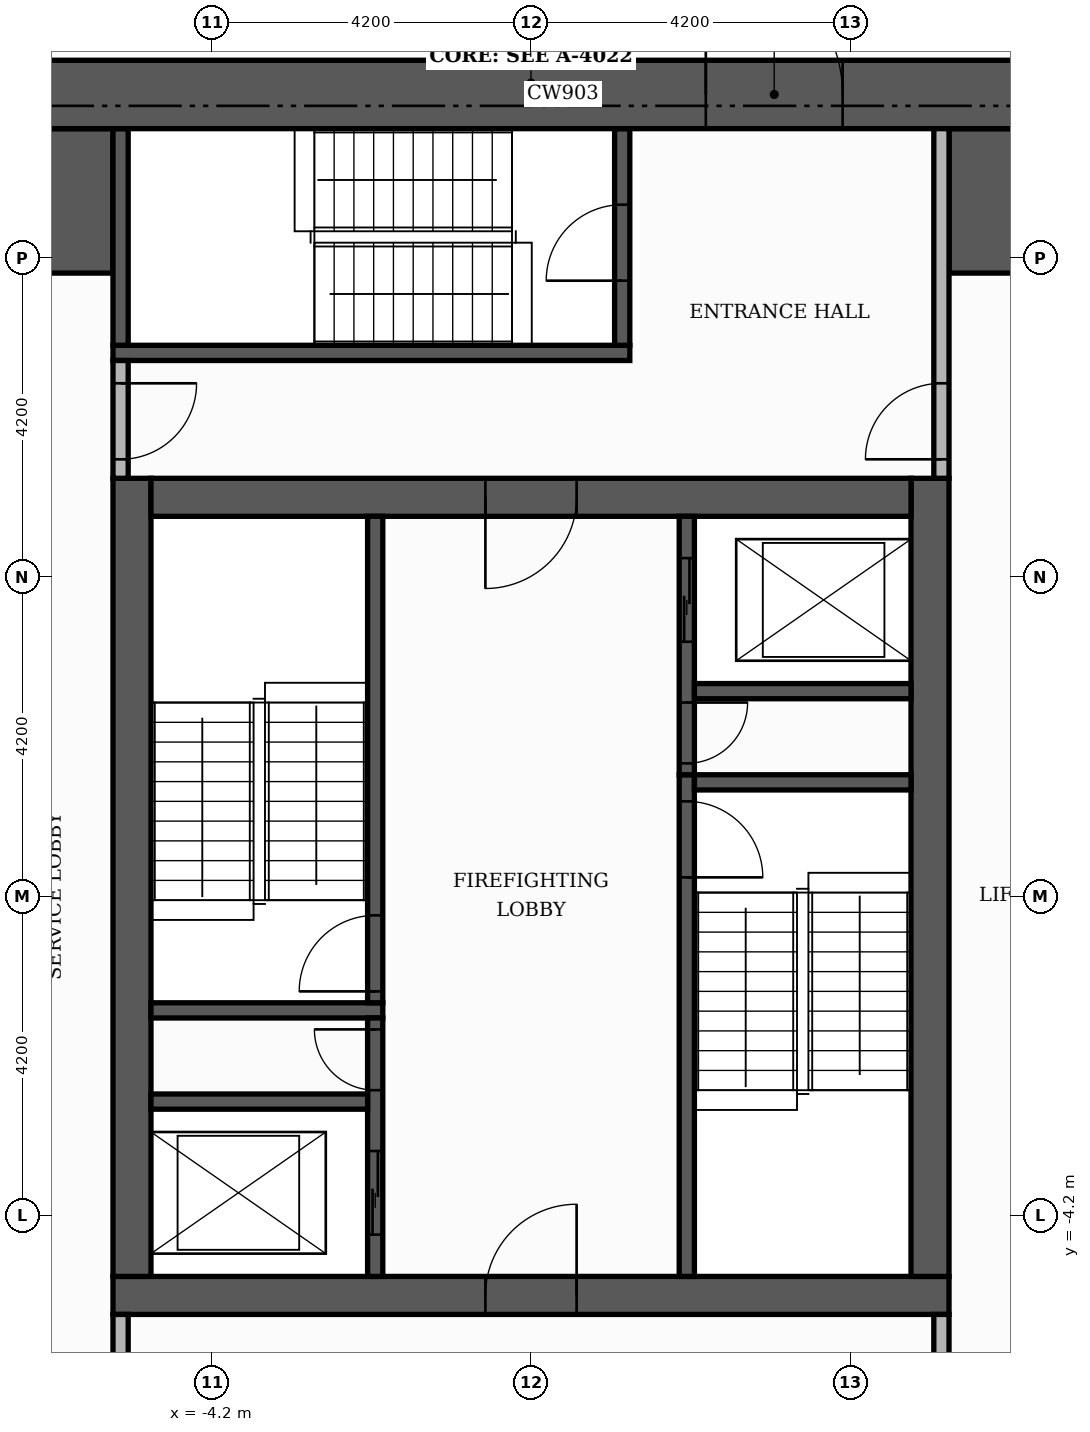
"""IFC4 building model, lengths in metres.
Left out: names, types, materials, properties, quantities, classifications, styles, units other than length and angle.
Written with IfcOpenShell. Run it as: python <this file> out.ifc"""

import sys

from ifc_helpers import new_model, si_unit, direction, frame, frame_2d, origin, place, context, subcontext, project, spatial, rectangle, extrude, element, fill, save


model = new_model("IFC4")
c1 = context("Model", 3, precision=1e-05, world=origin(), true_north=direction((0.0, 1.0)))
c2 = subcontext(c1, "Body", "Model", "MODEL_VIEW")
j1 = project(units=[si_unit("LENGTHUNIT", "METRE"), si_unit("PLANEANGLEUNIT", "RADIAN")], contexts=[c1])
p1 = place(None, origin())
s1 = spatial("IfcSite", under=j1, at=p1, CompositionType="ELEMENT")
p2 = place(p1, origin())
s2 = spatial("IfcBuilding", under=s1, at=p2, CompositionType="ELEMENT")
p3 = place(p2, frame((0.0, 0.0, 137.7)))
s3 = spatial("IfcBuildingStorey", under=s2, at=p3, CompositionType="ELEMENT", Elevation=137.7)
p4 = place(p3, frame((-5.5, -5.25, 0.0), z_axis=(0.0, 0.0, 1.0), x_axis=(1.0, 0.0, 0.0)))
e1 = element("IfcWall", 1, at=p4, inside=s3, PredefinedType="SHEAR", context=c2, shape_type="SweptSolid", body=[
    extrude(rectangle(XDim=11.0, YDim=0.5, at=frame_2d((5.5, 0.0))), origin(), (0.0, 0.0, 1.0), 3.48),
])
p5 = place(p4, frame((4.9, 0.0, 0.0)))
e2 = element("IfcOpeningElement", 2, at=p5, cuts=e1, PredefinedType="OPENING", context=c2, shape_type="SweptSolid", body=[
    extrude(rectangle(XDim=1.2, YDim=2.1, at=frame_2d((0.6, 1.05))), frame((0.0, 0.26, 0.0), z_axis=(0.0, -1.0, 0.0), x_axis=(1.0, 0.0, 0.0)), (0.0, 0.0, 1.0), 0.52),
])
for number, where, z_axis, x_axis in (
    (3, (-5.25, -5.0, 0.0), (0.0, 0.0, 1.0), (0.0, 1.0, 0.0)),
    (4, (5.25, -5.0, 0.0), (0.0, 0.0, 1.0), (0.0, 1.0, 0.0)),
):
    element("IfcWall", number, at=place(p3, frame(where, z_axis=z_axis, x_axis=x_axis)), inside=s3, PredefinedType="SHEAR", context=c2, shape_type="SweptSolid", body=[
        extrude(rectangle(XDim=10.5, YDim=0.5, at=frame_2d((5.25, 0.0))), origin(), (0.0, 0.0, 1.0), 3.48),
    ])
p6 = place(p3, frame((-5.0, 5.25, 0.0), z_axis=(0.0, 0.0, 1.0), x_axis=(1.0, 0.0, 0.0)))
e5 = element("IfcWall", 5, at=p6, inside=s3, PredefinedType="SHEAR", context=c2, shape_type="SweptSolid", body=[
    extrude(rectangle(XDim=10.0, YDim=0.5, at=frame_2d((5.0, 0.0))), origin(), (0.0, 0.0, 1.0), 3.48),
])
p7 = place(p6, frame((4.4, 0.0, 0.0)))
e6 = element("IfcOpeningElement", 6, at=p7, cuts=e5, PredefinedType="OPENING", context=c2, shape_type="SweptSolid", body=[
    extrude(rectangle(XDim=1.2, YDim=2.1, at=frame_2d((0.6, 1.05))), frame((0.0, 0.26, 0.0), z_axis=(0.0, -1.0, 0.0), x_axis=(1.0, 0.0, 0.0)), (0.0, 0.0, 1.0), 0.52),
])
for number, where, z_axis, x_axis in (
    (7, (-10.1, 9.15, 0.0), (0.0, 0.0, 1.0), (1.0, 0.0, 0.0)),
    (8, (5.5, 9.15, 0.0), (0.0, 0.0, 1.0), (1.0, 0.0, 0.0)),
):
    element("IfcWall", number, at=place(p3, frame(where, z_axis=z_axis, x_axis=x_axis)), inside=s3, PredefinedType="SHEAR", context=c2, shape_type="SweptSolid", body=[
        extrude(rectangle(XDim=4.6, YDim=1.9, at=frame_2d((2.3, 0.0))), origin(), (0.0, 0.0, 1.0), 3.48),
    ])
p8 = place(p3, frame((2.05, -5.0, 0.0), z_axis=(0.0, 0.0, 1.0), x_axis=(0.0, 1.0, 0.0)))
e9 = element("IfcWall", 9, at=p8, inside=s3, PredefinedType="SHEAR", context=c2, shape_type="SweptSolid", body=[
    extrude(rectangle(XDim=6.6, YDim=0.2, at=frame_2d((3.3, 0.0))), origin(), (0.0, 0.0, 1.0), 3.48),
])
p9 = place(p8, frame((5.25, 0.0, 0.0)))
e10 = element("IfcOpeningElement", 10, at=p9, cuts=e9, PredefinedType="OPENING", context=c2, shape_type="SweptSolid", body=[
    extrude(rectangle(XDim=1.0, YDim=2.1, at=frame_2d((0.5, 1.05))), frame((0.0, 0.11, 0.0), z_axis=(0.0, -1.0, 0.0), x_axis=(1.0, 0.0, 0.0)), (0.0, 0.0, 1.0), 0.22),
])
p10 = place(p3, frame((-5.0, -1.5, 0.0), z_axis=(0.0, 0.0, 1.0), x_axis=(1.0, 0.0, 0.0)))
e11 = element("IfcWall", 11, at=p10, inside=s3, PredefinedType="SHEAR", context=c2, shape_type="SweptSolid", body=[
    extrude(rectangle(XDim=3.05, YDim=0.2, at=frame_2d((1.525, 0.0))), origin(), (0.0, 0.0, 1.0), 3.48),
])
p11 = place(p3, frame((-2.05, -1.4, 0.0), z_axis=(0.0, 0.0, 1.0), x_axis=(0.0, 1.0, 0.0)))
e12 = element("IfcWall", 12, at=p11, inside=s3, PredefinedType="SHEAR", context=c2, shape_type="SweptSolid", body=[
    extrude(rectangle(XDim=6.4, YDim=0.2, at=frame_2d((3.2, 0.0))), origin(), (0.0, 0.0, 1.0), 3.48),
])
p12 = place(p11, frame((0.15, 0.0, 0.0)))
e13 = element("IfcOpeningElement", 13, at=p12, cuts=e12, PredefinedType="OPENING", context=c2, shape_type="SweptSolid", body=[
    extrude(rectangle(XDim=1.0, YDim=2.1, at=frame_2d((0.5, 1.05))), frame((0.0, 0.11, 0.0), z_axis=(0.0, -1.0, 0.0), x_axis=(1.0, 0.0, 0.0)), (0.0, 0.0, 1.0), 0.22),
])
p13 = place(p3, frame((2.15, 1.5, 0.0), z_axis=(0.0, 0.0, 1.0), x_axis=(1.0, 0.0, 0.0)))
e14 = element("IfcWall", 14, at=p13, inside=s3, PredefinedType="SHEAR", context=c2, shape_type="SweptSolid", body=[
    extrude(rectangle(XDim=2.85, YDim=0.2, at=frame_2d((1.425, 0.0))), origin(), (0.0, 0.0, 1.0), 3.48),
])
p14 = place(p3, frame((-5.5, 7.15, 0.0), z_axis=(0.0, 0.0, 1.0), x_axis=(1.0, 0.0, 0.0)))
e15 = element("IfcWall", 15, at=p14, inside=s3, PredefinedType="SHEAR", context=c2, shape_type="SweptSolid", body=[
    extrude(rectangle(XDim=6.8, YDim=0.2, at=frame_2d((3.4, 0.0))), origin(), (0.0, 0.0, 1.0), 3.48),
])
p15 = place(p3, frame((-5.4, 7.25, 0.0), z_axis=(0.0, 0.0, 1.0), x_axis=(0.0, 1.0, 0.0)))
e16 = element("IfcWall", 16, at=p15, inside=s3, PredefinedType="SHEAR", context=c2, shape_type="SweptSolid", body=[
    extrude(rectangle(XDim=2.85, YDim=0.2, at=frame_2d((1.425, 0.0))), origin(), (0.0, 0.0, 1.0), 3.48),
])
p16 = place(p3, frame((1.2, 7.25, 0.0), z_axis=(0.0, 0.0, 1.0), x_axis=(0.0, 1.0, 0.0)))
e17 = element("IfcWall", 17, at=p16, inside=s3, PredefinedType="SHEAR", context=c2, shape_type="SweptSolid", body=[
    extrude(rectangle(XDim=2.85, YDim=0.2, at=frame_2d((1.425, 0.0))), origin(), (0.0, 0.0, 1.0), 3.48),
])
p17 = place(p16, frame((0.85, 0.0, 0.0)))
e18 = element("IfcOpeningElement", 18, at=p17, cuts=e17, PredefinedType="OPENING", context=c2, shape_type="SweptSolid", body=[
    extrude(rectangle(XDim=1.0, YDim=2.1, at=frame_2d((0.5, 1.05))), frame((0.0, 0.11, 0.0), z_axis=(0.0, -1.0, 0.0), x_axis=(1.0, 0.0, 0.0)), (0.0, 0.0, 1.0), 0.22),
])
p18 = place(p3, frame((-2.05, -5.0, 0.0), z_axis=(0.0, 0.0, 1.0), x_axis=(0.0, 1.0, 0.0)))
e19 = element("IfcWall", 19, at=p18, inside=s3, PredefinedType="SHEAR", context=c2, shape_type="SweptSolid", body=[
    extrude(rectangle(XDim=3.4, YDim=0.2, at=frame_2d((1.7, 0.0))), origin(), (0.0, 0.0, 1.0), 3.48),
])
p19 = place(p18, frame((0.55, 0.0, 0.0)))
e20 = element("IfcOpeningElement", 20, at=p19, cuts=e19, PredefinedType="OPENING", context=c2, shape_type="SweptSolid", body=[
    extrude(rectangle(XDim=1.1, YDim=2.1, at=frame_2d((0.55, 1.05))), frame((0.0, 0.11, 0.0), z_axis=(0.0, -1.0, 0.0), x_axis=(1.0, 0.0, 0.0)), (0.0, 0.0, 1.0), 0.22),
])
p20 = place(p18, frame((2.45, 0.0, 0.0)))
e21 = element("IfcOpeningElement", 21, at=p20, cuts=e19, PredefinedType="OPENING", context=c2, shape_type="SweptSolid", body=[
    extrude(rectangle(XDim=0.8, YDim=2.1, at=frame_2d((0.4, 1.05))), frame((0.0, 0.11, 0.0), z_axis=(0.0, -1.0, 0.0), x_axis=(1.0, 0.0, 0.0)), (0.0, 0.0, 1.0), 0.22),
])
p21 = place(p3, frame((-5.0, -2.7, 0.0), z_axis=(0.0, 0.0, 1.0), x_axis=(1.0, 0.0, 0.0)))
e22 = element("IfcWall", 22, at=p21, inside=s3, PredefinedType="SHEAR", context=c2, shape_type="SweptSolid", body=[
    extrude(rectangle(XDim=2.85, YDim=0.2, at=frame_2d((1.425, 0.0))), origin(), (0.0, 0.0, 1.0), 3.48),
])
p22 = place(p3, frame((2.05, 1.6, 0.0), z_axis=(0.0, 0.0, 1.0), x_axis=(0.0, 1.0, 0.0)))
e23 = element("IfcWall", 23, at=p22, inside=s3, PredefinedType="SHEAR", context=c2, shape_type="SweptSolid", body=[
    extrude(rectangle(XDim=3.4, YDim=0.2, at=frame_2d((1.7, 0.0))), origin(), (0.0, 0.0, 1.0), 3.48),
])
p23 = place(p22, frame((1.75, 0.0, 0.0)))
e24 = element("IfcOpeningElement", 24, at=p23, cuts=e23, PredefinedType="OPENING", context=c2, shape_type="SweptSolid", body=[
    extrude(rectangle(XDim=1.1, YDim=2.1, at=frame_2d((0.55, 1.05))), frame((0.0, 0.11, 0.0), z_axis=(0.0, -1.0, 0.0), x_axis=(1.0, 0.0, 0.0)), (0.0, 0.0, 1.0), 0.22),
])
p24 = place(p22, frame((0.15, 0.0, 0.0)))
e25 = element("IfcOpeningElement", 25, at=p24, cuts=e23, PredefinedType="OPENING", context=c2, shape_type="SweptSolid", body=[
    extrude(rectangle(XDim=0.8, YDim=2.1, at=frame_2d((0.4, 1.05))), frame((0.0, 0.11, 0.0), z_axis=(0.0, -1.0, 0.0), x_axis=(1.0, 0.0, 0.0)), (0.0, 0.0, 1.0), 0.22),
])
p25 = place(p3, frame((2.15, 2.7, 0.0), z_axis=(0.0, 0.0, 1.0), x_axis=(1.0, 0.0, 0.0)))
e26 = element("IfcWall", 26, at=p25, inside=s3, PredefinedType="SHEAR", context=c2, shape_type="SweptSolid", body=[
    extrude(rectangle(XDim=2.85, YDim=0.2, at=frame_2d((1.425, 0.0))), origin(), (0.0, 0.0, 1.0), 3.48),
])
p26 = place(p3, frame((-11.0, 10.55, 0.0), z_axis=(0.0, 0.0, 1.0), x_axis=(1.0, 0.0, 0.0)))
e27 = element("IfcWall", 27, at=p26, inside=s3, PredefinedType="SHEAR", context=c2, shape_type="SweptSolid", body=[
    extrude(rectangle(XDim=22.0, YDim=0.9, at=frame_2d((11.0, 0.0))), origin(), (0.0, 0.0, 1.0), 3.48),
])
p27 = place(p26, frame((13.3, 0.0, 0.0)))
e28 = element("IfcOpeningElement", 28, at=p27, cuts=e27, PredefinedType="OPENING", context=c2, shape_type="SweptSolid", body=[
    extrude(rectangle(XDim=1.8, YDim=2.2, at=frame_2d((0.9, 1.1))), frame((0.0, 0.46, 0.0), z_axis=(0.0, -1.0, 0.0), x_axis=(1.0, 0.0, 0.0)), (0.0, 0.0, 1.0), 0.92),
])
p28 = place(p3, frame((-5.4, -10.1, 0.0), z_axis=(0.0, 0.0, 1.0), x_axis=(0.0, 1.0, 0.0)))
e29 = element("IfcWall", 29, at=p28, inside=s3, PredefinedType="PARTITIONING", context=c2, shape_type="SweptSolid", body=[
    extrude(rectangle(XDim=4.6, YDim=0.2, at=frame_2d((2.3, 0.0))), origin(), (0.0, 0.0, 1.0), 3.48),
])
p29 = place(p28, frame((2.9, 0.0, 0.0)))
e30 = element("IfcOpeningElement", 30, at=p29, cuts=e29, PredefinedType="OPENING", context=c2, shape_type="SweptSolid", body=[
    extrude(rectangle(XDim=1.0, YDim=2.1, at=frame_2d((0.5, 1.05))), frame((0.0, 0.11, 0.0), z_axis=(0.0, -1.0, 0.0), x_axis=(1.0, 0.0, 0.0)), (0.0, 0.0, 1.0), 0.22),
])
p30 = place(p3, frame((5.4, -10.1, 0.0), z_axis=(0.0, 0.0, 1.0), x_axis=(0.0, 1.0, 0.0)))
e31 = element("IfcWall", 31, at=p30, inside=s3, PredefinedType="PARTITIONING", context=c2, shape_type="SweptSolid", body=[
    extrude(rectangle(XDim=4.6, YDim=0.2, at=frame_2d((2.3, 0.0))), origin(), (0.0, 0.0, 1.0), 3.48),
])
p31 = place(p30, frame((2.9, 0.0, 0.0)))
e32 = element("IfcOpeningElement", 32, at=p31, cuts=e31, PredefinedType="OPENING", context=c2, shape_type="SweptSolid", body=[
    extrude(rectangle(XDim=1.0, YDim=2.1, at=frame_2d((0.5, 1.05))), frame((0.0, 0.11, 0.0), z_axis=(0.0, -1.0, 0.0), x_axis=(1.0, 0.0, 0.0)), (0.0, 0.0, 1.0), 0.22),
])
p32 = place(p3, frame((-5.4, 5.5, 0.0), z_axis=(0.0, 0.0, 1.0), x_axis=(0.0, 1.0, 0.0)))
e33 = element("IfcWall", 33, at=p32, inside=s3, PredefinedType="PARTITIONING", context=c2, shape_type="SweptSolid", body=[
    extrude(rectangle(XDim=1.55, YDim=0.2, at=frame_2d((0.775, 0.0))), origin(), (0.0, 0.0, 1.0), 3.48),
])
p33 = place(p32, frame((0.25, 0.0, 0.0)))
e34 = element("IfcOpeningElement", 34, at=p33, cuts=e33, PredefinedType="OPENING", context=c2, shape_type="SweptSolid", body=[
    extrude(rectangle(XDim=1.0, YDim=2.1, at=frame_2d((0.5, 1.05))), frame((0.0, 0.11, 0.0), z_axis=(0.0, -1.0, 0.0), x_axis=(1.0, 0.0, 0.0)), (0.0, 0.0, 1.0), 0.22),
])
p34 = place(p3, frame((5.4, 5.5, 0.0), z_axis=(0.0, 0.0, 1.0), x_axis=(0.0, 1.0, 0.0)))
e35 = element("IfcWall", 35, at=p34, inside=s3, PredefinedType="PARTITIONING", context=c2, shape_type="SweptSolid", body=[
    extrude(rectangle(XDim=4.6, YDim=0.2, at=frame_2d((2.3, 0.0))), origin(), (0.0, 0.0, 1.0), 3.48),
])
p35 = place(p34, frame((0.25, 0.0, 0.0)))
e36 = element("IfcOpeningElement", 36, at=p35, cuts=e35, PredefinedType="OPENING", context=c2, shape_type="SweptSolid", body=[
    extrude(rectangle(XDim=1.0, YDim=2.1, at=frame_2d((0.5, 1.05))), frame((0.0, 0.11, 0.0), z_axis=(0.0, -1.0, 0.0), x_axis=(1.0, 0.0, 0.0)), (0.0, 0.0, 1.0), 0.22),
])
p36 = place(p23, origin())
e37 = element("IfcDoor", 37, at=p36, inside=s3, OperationType="SLIDING_TO_LEFT", PredefinedType="DOOR", context=c2, shape_type="SweptSolid", body=[
    extrude(rectangle(XDim=1.1, YDim=2.1, at=frame_2d((0.55, 1.05))), frame((0.0, 0.025, 0.0), z_axis=(0.0, -1.0, 0.0), x_axis=(1.0, 0.0, 0.0)), (0.0, 0.0, 1.0), 0.05),
])
fill(e24, e37)
p37 = place(p19, origin())
e38 = element("IfcDoor", 38, at=p37, inside=s3, OperationType="SLIDING_TO_LEFT", PredefinedType="DOOR", context=c2, shape_type="SweptSolid", body=[
    extrude(rectangle(XDim=1.1, YDim=2.1, at=frame_2d((0.55, 1.05))), frame((0.0, 0.025, 0.0), z_axis=(0.0, -1.0, 0.0), x_axis=(1.0, 0.0, 0.0)), (0.0, 0.0, 1.0), 0.05),
])
fill(e20, e38)
p38 = place(p12, origin())
e39 = element("IfcDoor", 39, at=p38, inside=s3, OperationType="SINGLE_SWING_LEFT", PredefinedType="DOOR", context=c2, shape_type="SweptSolid", body=[
    extrude(rectangle(XDim=1.0, YDim=2.1, at=frame_2d((0.5, 1.05))), frame((0.0, 0.025, 0.0), z_axis=(0.0, -1.0, 0.0), x_axis=(1.0, 0.0, 0.0)), (0.0, 0.0, 1.0), 0.05),
])
fill(e13, e39)
p39 = place(p9, frame((1.0, 0.0, 0.0), z_axis=(0.0, 0.0, 1.0), x_axis=(-1.0, 0.0, 0.0)))
e40 = element("IfcDoor", 40, at=p39, inside=s3, OperationType="SINGLE_SWING_LEFT", PredefinedType="DOOR", context=c2, shape_type="SweptSolid", body=[
    extrude(rectangle(XDim=1.0, YDim=2.1, at=frame_2d((0.5, 1.05))), frame((0.0, 0.025, 0.0), z_axis=(0.0, -1.0, 0.0), x_axis=(1.0, 0.0, 0.0)), (0.0, 0.0, 1.0), 0.05),
])
fill(e10, e40)
p40 = place(p24, frame((0.8, 0.0, 0.0), z_axis=(0.0, 0.0, 1.0), x_axis=(-1.0, 0.0, 0.0)))
e41 = element("IfcDoor", 41, at=p40, inside=s3, OperationType="SINGLE_SWING_RIGHT", PredefinedType="DOOR", context=c2, shape_type="SweptSolid", body=[
    extrude(rectangle(XDim=0.8, YDim=2.1, at=frame_2d((0.4, 1.05))), frame((0.0, 0.025, 0.0), z_axis=(0.0, -1.0, 0.0), x_axis=(1.0, 0.0, 0.0)), (0.0, 0.0, 1.0), 0.05),
])
fill(e25, e41)
p41 = place(p20, origin())
e42 = element("IfcDoor", 42, at=p41, inside=s3, OperationType="SINGLE_SWING_RIGHT", PredefinedType="DOOR", context=c2, shape_type="SweptSolid", body=[
    extrude(rectangle(XDim=0.8, YDim=2.1, at=frame_2d((0.4, 1.05))), frame((0.0, 0.025, 0.0), z_axis=(0.0, -1.0, 0.0), x_axis=(1.0, 0.0, 0.0)), (0.0, 0.0, 1.0), 0.05),
])
fill(e21, e42)
p42 = place(p7, frame((1.2, 0.0, 0.0), z_axis=(0.0, 0.0, 1.0), x_axis=(-1.0, 0.0, 0.0)))
e43 = element("IfcDoor", 43, at=p42, inside=s3, OperationType="SINGLE_SWING_LEFT", PredefinedType="DOOR", context=c2, shape_type="SweptSolid", body=[
    extrude(rectangle(XDim=1.2, YDim=2.1, at=frame_2d((0.6, 1.05))), frame((0.0, 0.025, 0.0), z_axis=(0.0, -1.0, 0.0), x_axis=(1.0, 0.0, 0.0)), (0.0, 0.0, 1.0), 0.05),
])
fill(e6, e43)
p43 = place(p5, origin())
e44 = element("IfcDoor", 44, at=p43, inside=s3, OperationType="SINGLE_SWING_RIGHT", PredefinedType="DOOR", context=c2, shape_type="SweptSolid", body=[
    extrude(rectangle(XDim=1.2, YDim=2.1, at=frame_2d((0.6, 1.05))), frame((0.0, 0.025, 0.0), z_axis=(0.0, -1.0, 0.0), x_axis=(1.0, 0.0, 0.0)), (0.0, 0.0, 1.0), 0.05),
])
fill(e2, e44)
p44 = place(p17, origin())
e45 = element("IfcDoor", 45, at=p44, inside=s3, OperationType="SINGLE_SWING_LEFT", PredefinedType="DOOR", context=c2, shape_type="SweptSolid", body=[
    extrude(rectangle(XDim=1.0, YDim=2.1, at=frame_2d((0.5, 1.05))), frame((0.0, 0.025, 0.0), z_axis=(0.0, -1.0, 0.0), x_axis=(1.0, 0.0, 0.0)), (0.0, 0.0, 1.0), 0.05),
])
fill(e18, e45)
p45 = place(p33, frame((1.0, 0.0, 0.0), z_axis=(0.0, 0.0, 1.0), x_axis=(-1.0, 0.0, 0.0)))
e46 = element("IfcDoor", 46, at=p45, inside=s3, OperationType="SINGLE_SWING_RIGHT", PredefinedType="DOOR", context=c2, shape_type="SweptSolid", body=[
    extrude(rectangle(XDim=1.0, YDim=2.1, at=frame_2d((0.5, 1.05))), frame((0.0, 0.025, 0.0), z_axis=(0.0, -1.0, 0.0), x_axis=(1.0, 0.0, 0.0)), (0.0, 0.0, 1.0), 0.05),
])
fill(e34, e46)
p46 = place(p35, origin())
e47 = element("IfcDoor", 47, at=p46, inside=s3, OperationType="SINGLE_SWING_LEFT", PredefinedType="DOOR", context=c2, shape_type="SweptSolid", body=[
    extrude(rectangle(XDim=1.0, YDim=2.1, at=frame_2d((0.5, 1.05))), frame((0.0, 0.025, 0.0), z_axis=(0.0, -1.0, 0.0), x_axis=(1.0, 0.0, 0.0)), (0.0, 0.0, 1.0), 0.05),
])
fill(e36, e47)
p47 = place(p27, origin())
e48 = element("IfcDoor", 48, at=p47, inside=s3, OperationType="DOUBLE_DOOR_SINGLE_SWING", PredefinedType="DOOR", context=c2, shape_type="SweptSolid", body=[
    extrude(rectangle(XDim=1.8, YDim=2.2, at=frame_2d((0.9, 1.1))), frame((0.0, 0.025, 0.0), z_axis=(0.0, -1.0, 0.0), x_axis=(1.0, 0.0, 0.0)), (0.0, 0.0, 1.0), 0.05),
])
fill(e28, e48)
save(model, sys.argv[1])
